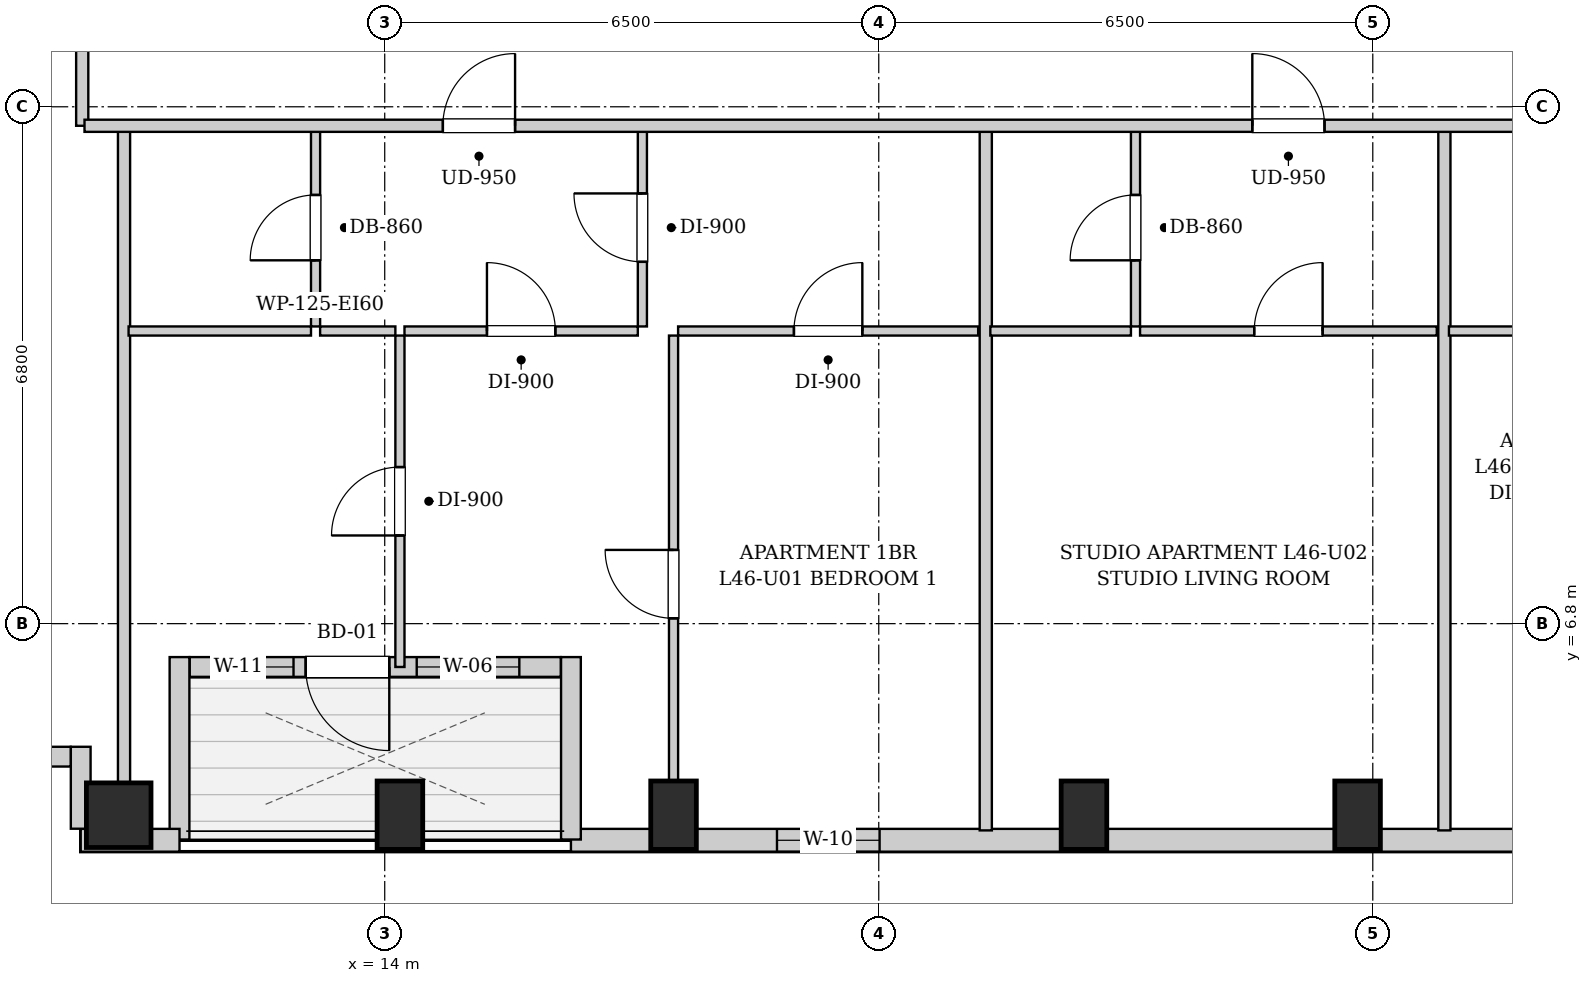
"""IFC4 building model, lengths in metres.
Left out: names, types, materials, properties, quantities, classifications, styles, units other than length and angle.
Written with IfcOpenShell. Run it as: python <this file> out.ifc"""

import sys

from ifc_helpers import new_model, si_unit, direction, frame, frame_2d, origin, origin_2d, place, context, subcontext, project, spatial, rectangle, extrude, element, fill, save


model = new_model("IFC4")
c1 = context("Model", 3, precision=1e-05, world=origin(), true_north=direction((0.0, 1.0)))
c2 = subcontext(c1, "Body", "Model", "MODEL_VIEW")
j1 = project(units=[si_unit("LENGTHUNIT", "METRE"), si_unit("PLANEANGLEUNIT", "RADIAN")], contexts=[c1])
p1 = place(None, origin())
s1 = spatial("IfcSite", under=j1, at=p1, CompositionType="ELEMENT")
p2 = place(p1, origin())
s2 = spatial("IfcBuilding", under=s1, at=p2, CompositionType="ELEMENT")
p3 = place(p2, frame((0.0, 0.0, 160.15)))
s3 = spatial("IfcBuildingStorey", under=s2, at=p3, CompositionType="ELEMENT", Elevation=160.15)
p4 = place(p3, frame((10.5, 4.28, 0.0), z_axis=(0.0, 0.0, 1.0), x_axis=(1.0, 0.0, 0.0)))
e1 = element("IfcColumn", 1, at=p4, inside=s3, PredefinedType="COLUMN", context=c2, shape_type="SweptSolid", body=[
    extrude(rectangle(XDim=0.85, YDim=0.85, at=origin_2d()), origin(), (0.0, 0.0, 1.0), 3.25),
])
for number, where, z_axis, x_axis in (
    (2, (14.2, 4.28, 0.0), (0.0, 0.0, 1.0), (1.0, 0.0, 0.0)),
    (3, (17.8, 4.28, 0.0), (0.0, 0.0, 1.0), (1.0, 0.0, 0.0)),
    (4, (23.2, 4.28, 0.0), (0.0, 0.0, 1.0), (1.0, 0.0, 0.0)),
    (5, (26.8, 4.28, 0.0), (0.0, 0.0, 1.0), (1.0, 0.0, 0.0)),
):
    element("IfcColumn", number, at=place(p3, frame(where, z_axis=z_axis, x_axis=x_axis)), inside=s3, PredefinedType="COLUMN", context=c2, shape_type="SweptSolid", body=[
        extrude(rectangle(XDim=0.6, YDim=0.9, at=origin_2d()), origin(), (0.0, 0.0, 1.0), 3.25),
    ])
p5 = place(p3, frame((31.5, 3.95, 0.0), z_axis=(0.0, 0.0, 1.0), x_axis=(-1.0, 0.0, 0.0)))
e6 = element("IfcWall", 6, at=p5, inside=s3, PredefinedType="SOLIDWALL", context=c2, shape_type="SweptSolid", body=[
    extrude(rectangle(XDim=15.05, YDim=0.3, at=frame_2d((7.525, 0.0))), origin(), (0.0, 0.0, 1.0), 2.99),
])
p6 = place(p5, frame((10.989, 0.0, 0.55)))
e7 = element("IfcOpeningElement", 7, at=p6, cuts=e6, PredefinedType="OPENING", context=c2, shape_type="SweptSolid", body=[
    extrude(rectangle(XDim=1.35, YDim=1.2, at=frame_2d((0.675, 0.6))), frame((0.0, 0.16, 0.0), z_axis=(0.0, -1.0, 0.0), x_axis=(1.0, 0.0, 0.0)), (0.0, 0.0, 1.0), 0.32),
])
p7 = place(p5, frame((1.282, 0.0, 0.55)))
e8 = element("IfcOpeningElement", 8, at=p7, cuts=e6, PredefinedType="OPENING", context=c2, shape_type="SweptSolid", body=[
    extrude(rectangle(XDim=1.35, YDim=1.2, at=frame_2d((0.675, 0.6))), frame((0.0, 0.16, 0.0), z_axis=(0.0, -1.0, 0.0), x_axis=(1.0, 0.0, 0.0)), (0.0, 0.0, 1.0), 0.32),
])
p8 = place(p3, frame((16.45, 3.96, 0.0), z_axis=(0.0, 0.0, 1.0), x_axis=(0.0, 1.0, 0.0)))
e9 = element("IfcWall", 9, at=p8, inside=s3, PredefinedType="SOLIDWALL", context=c2, shape_type="SweptSolid", body=[
    extrude(rectangle(XDim=2.4, YDim=0.26, at=frame_2d((1.2, 0.0))), origin(), (0.0, 0.0, 1.0), 2.99),
])
p9 = place(p3, frame((16.316, 6.23, 0.0), z_axis=(0.0, 0.0, 1.0), x_axis=(-1.0, 0.0, 0.0)))
e10 = element("IfcWall", 10, at=p9, inside=s3, PredefinedType="SOLIDWALL", context=c2, shape_type="SweptSolid", body=[
    extrude(rectangle(XDim=4.882, YDim=0.26, at=frame_2d((2.441, 0.0))), origin(), (0.0, 0.0, 1.0), 2.99),
])
p10 = place(p9, frame((2.256, 0.0, 0.0)))
e11 = element("IfcOpeningElement", 11, at=p10, cuts=e10, PredefinedType="OPENING", context=c2, shape_type="SweptSolid", body=[
    extrude(rectangle(XDim=1.1, YDim=2.0, at=frame_2d((0.55, 1.0))), frame((0.0, 0.14, 0.0), z_axis=(0.0, -1.0, 0.0), x_axis=(1.0, 0.0, 0.0)), (0.0, 0.0, 1.0), 0.28),
])
p11 = place(p9, frame((3.516, 0.0, 0.55)))
e12 = element("IfcOpeningElement", 12, at=p11, cuts=e10, PredefinedType="OPENING", context=c2, shape_type="SweptSolid", body=[
    extrude(rectangle(XDim=0.85, YDim=1.2, at=frame_2d((0.425, 0.6))), frame((0.0, 0.14, 0.0), z_axis=(0.0, -1.0, 0.0), x_axis=(1.0, 0.0, 0.0)), (0.0, 0.0, 1.0), 0.28),
])
p12 = place(p9, frame((0.545, 0.0, 0.85)))
e13 = element("IfcOpeningElement", 13, at=p12, cuts=e10, PredefinedType="OPENING", context=c2, shape_type="SweptSolid", body=[
    extrude(rectangle(XDim=1.35, YDim=1.65, at=frame_2d((0.675, 0.825))), frame((0.0, 0.14, 0.0), z_axis=(0.0, -1.0, 0.0), x_axis=(1.0, 0.0, 0.0)), (0.0, 0.0, 1.0), 0.28),
])
p13 = place(p3, frame((11.3, 6.36, 0.0), z_axis=(0.0, 0.0, 1.0), x_axis=(0.0, -1.0, 0.0)))
e14 = element("IfcWall", 14, at=p13, inside=s3, PredefinedType="SOLIDWALL", context=c2, shape_type="SweptSolid", body=[
    extrude(rectangle(XDim=2.4, YDim=0.26, at=frame_2d((1.2, 0.0))), origin(), (0.0, 0.0, 1.0), 2.99),
])
p14 = place(p3, frame((11.3, 3.95, 0.0), z_axis=(0.0, 0.0, 1.0), x_axis=(-1.0, 0.0, 0.0)))
e15 = element("IfcWall", 15, at=p14, inside=s3, PredefinedType="SOLIDWALL", context=c2, shape_type="SweptSolid", body=[
    extrude(rectangle(XDim=1.3, YDim=0.3, at=frame_2d((0.65, 0.0))), origin(), (0.0, 0.0, 1.0), 2.99),
])
p15 = place(p3, frame((10.0, 4.102, 0.0), z_axis=(0.0, 0.0, 1.0), x_axis=(0.0, 1.0, 0.0)))
e16 = element("IfcWall", 16, at=p15, inside=s3, PredefinedType="SOLIDWALL", context=c2, shape_type="SweptSolid", body=[
    extrude(rectangle(XDim=1.078, YDim=0.26, at=frame_2d((0.539, 0.0))), origin(), (0.0, 0.0, 1.0), 2.99),
])
p16 = place(p3, frame((9.868, 5.05, 0.0), z_axis=(0.0, 0.0, 1.0), x_axis=(-1.0, 0.0, 0.0)))
e17 = element("IfcWall", 17, at=p16, inside=s3, PredefinedType="SOLIDWALL", context=c2, shape_type="SweptSolid", body=[
    extrude(rectangle(XDim=1.248, YDim=0.26, at=frame_2d((0.624, 0.0))), origin(), (0.0, 0.0, 1.0), 2.99),
])
p17 = place(p3, frame((10.02, 13.35, 0.0), z_axis=(0.0, 0.0, 1.0), x_axis=(0.0, 1.0, 0.0)))
e18 = element("IfcWall", 18, at=p17, inside=s3, PredefinedType="PARTITIONING", context=c2, shape_type="SweptSolid", body=[
    extrude(rectangle(XDim=1.74, YDim=0.16, at=frame_2d((0.87, 0.0))), origin(), (0.0, 0.0, 1.0), 2.99),
])
p18 = place(p3, frame((10.57, 4.08, 0.0), z_axis=(0.0, 0.0, 1.0), x_axis=(0.0, 1.0, 0.0)))
e19 = element("IfcWall", 19, at=p18, inside=s3, PredefinedType="PARTITIONING", context=c2, shape_type="SweptSolid", body=[
    extrude(rectangle(XDim=9.23, YDim=0.16, at=frame_2d((4.615, 0.0))), origin(), (0.0, 0.0, 1.0), 2.99),
])
p19 = place(p3, frame((13.09, 10.71, 0.0), z_axis=(0.0, 0.0, 1.0), x_axis=(0.0, 1.0, 0.0)))
e20 = element("IfcWall", 20, at=p19, inside=s3, PredefinedType="PARTITIONING", context=c2, shape_type="SweptSolid", body=[
    extrude(rectangle(XDim=2.6, YDim=0.12, at=frame_2d((1.3, 0.0))), origin(), (0.0, 0.0, 1.0), 2.99),
])
p20 = place(p19, frame((0.87, 0.0, 0.0)))
e21 = element("IfcOpeningElement", 21, at=p20, cuts=e20, PredefinedType="OPENING", context=c2, shape_type="SweptSolid", body=[
    extrude(rectangle(XDim=0.86, YDim=2.05, at=frame_2d((0.43, 1.025))), frame((0.0, 0.07, 0.0), z_axis=(0.0, -1.0, 0.0), x_axis=(1.0, 0.0, 0.0)), (0.0, 0.0, 1.0), 0.14),
])
p21 = place(p3, frame((10.63, 10.65, 0.0), z_axis=(0.0, 0.0, 1.0), x_axis=(1.0, 0.0, 0.0)))
e22 = element("IfcWall", 22, at=p21, inside=s3, PredefinedType="PARTITIONING", context=c2, shape_type="SweptSolid", body=[
    extrude(rectangle(XDim=2.4, YDim=0.12, at=frame_2d((1.2, 0.0))), origin(), (0.0, 0.0, 1.0), 2.99),
])
p22 = place(p3, frame((17.39, 10.71, 0.0), z_axis=(0.0, 0.0, 1.0), x_axis=(0.0, 1.0, 0.0)))
e23 = element("IfcWall", 23, at=p22, inside=s3, PredefinedType="PARTITIONING", context=c2, shape_type="SweptSolid", body=[
    extrude(rectangle(XDim=2.6, YDim=0.12, at=frame_2d((1.3, 0.0))), origin(), (0.0, 0.0, 1.0), 2.99),
])
p23 = place(p22, frame((0.85, 0.0, 0.0)))
e24 = element("IfcOpeningElement", 24, at=p23, cuts=e23, PredefinedType="OPENING", context=c2, shape_type="SweptSolid", body=[
    extrude(rectangle(XDim=0.9, YDim=2.05, at=frame_2d((0.45, 1.025))), frame((0.0, 0.07, 0.0), z_axis=(0.0, -1.0, 0.0), x_axis=(1.0, 0.0, 0.0)), (0.0, 0.0, 1.0), 0.14),
])
p24 = place(p3, frame((13.15, 10.65, 0.0), z_axis=(0.0, 0.0, 1.0), x_axis=(1.0, 0.0, 0.0)))
e25 = element("IfcWall", 25, at=p24, inside=s3, PredefinedType="PARTITIONING", context=c2, shape_type="SweptSolid", body=[
    extrude(rectangle(XDim=0.99, YDim=0.12, at=frame_2d((0.495, 0.0))), origin(), (0.0, 0.0, 1.0), 2.99),
])
p25 = place(p3, frame((14.26, 10.65, 0.0), z_axis=(0.0, 0.0, 1.0), x_axis=(1.0, 0.0, 0.0)))
e26 = element("IfcWall", 26, at=p25, inside=s3, PredefinedType="PARTITIONING", context=c2, shape_type="SweptSolid", body=[
    extrude(rectangle(XDim=3.07, YDim=0.12, at=frame_2d((1.535, 0.0))), origin(), (0.0, 0.0, 1.0), 2.99),
])
p26 = place(p25, frame((1.085, 0.0, 0.0)))
e27 = element("IfcOpeningElement", 27, at=p26, cuts=e26, PredefinedType="OPENING", context=c2, shape_type="SweptSolid", body=[
    extrude(rectangle(XDim=0.9, YDim=2.05, at=frame_2d((0.45, 1.025))), frame((0.0, 0.07, 0.0), z_axis=(0.0, -1.0, 0.0), x_axis=(1.0, 0.0, 0.0)), (0.0, 0.0, 1.0), 0.14),
])
p27 = place(p3, frame((17.86, 10.65, 0.0), z_axis=(0.0, 0.0, 1.0), x_axis=(1.0, 0.0, 0.0)))
e28 = element("IfcWall", 28, at=p27, inside=s3, PredefinedType="PARTITIONING", context=c2, shape_type="SweptSolid", body=[
    extrude(rectangle(XDim=3.948, YDim=0.12, at=frame_2d((1.974, 0.0))), origin(), (0.0, 0.0, 1.0), 2.99),
])
p28 = place(p27, frame((1.524, 0.0, 0.0)))
e29 = element("IfcOpeningElement", 29, at=p28, cuts=e28, PredefinedType="OPENING", context=c2, shape_type="SweptSolid", body=[
    extrude(rectangle(XDim=0.9, YDim=2.05, at=frame_2d((0.45, 1.025))), frame((0.0, 0.07, 0.0), z_axis=(0.0, -1.0, 0.0), x_axis=(1.0, 0.0, 0.0)), (0.0, 0.0, 1.0), 0.14),
])
p29 = place(p3, frame((14.2, 6.23, 0.0), z_axis=(0.0, 0.0, 1.0), x_axis=(0.0, 1.0, 0.0)))
e30 = element("IfcWall", 30, at=p29, inside=s3, PredefinedType="PARTITIONING", context=c2, shape_type="SweptSolid", body=[
    extrude(rectangle(XDim=4.36, YDim=0.12, at=frame_2d((2.18, 0.0))), origin(), (0.0, 0.0, 1.0), 2.99),
])
p30 = place(p29, frame((1.73, 0.0, 0.0)))
e31 = element("IfcOpeningElement", 31, at=p30, cuts=e30, PredefinedType="OPENING", context=c2, shape_type="SweptSolid", body=[
    extrude(rectangle(XDim=0.9, YDim=2.05, at=frame_2d((0.45, 1.025))), frame((0.0, 0.07, 0.0), z_axis=(0.0, -1.0, 0.0), x_axis=(1.0, 0.0, 0.0)), (0.0, 0.0, 1.0), 0.14),
])
p31 = place(p3, frame((17.8, 4.08, 0.0), z_axis=(0.0, 0.0, 1.0), x_axis=(0.0, 1.0, 0.0)))
e32 = element("IfcWall", 32, at=p31, inside=s3, PredefinedType="PARTITIONING", context=c2, shape_type="SweptSolid", body=[
    extrude(rectangle(XDim=6.51, YDim=0.12, at=frame_2d((3.255, 0.0))), origin(), (0.0, 0.0, 1.0), 2.442),
])
p32 = place(p31, frame((2.79, 0.0, 0.0)))
e33 = element("IfcOpeningElement", 33, at=p32, cuts=e32, PredefinedType="OPENING", context=c2, shape_type="SweptSolid", body=[
    extrude(rectangle(XDim=0.9, YDim=2.05, at=frame_2d((0.45, 1.025))), frame((0.0, 0.07, 0.0), z_axis=(0.0, -1.0, 0.0), x_axis=(1.0, 0.0, 0.0)), (0.0, 0.0, 1.0), 0.14),
])
p33 = place(p3, frame((21.908, 4.08, 0.0), z_axis=(0.0, 0.0, 1.0), x_axis=(0.0, 1.0, 0.0)))
e34 = element("IfcWall", 34, at=p33, inside=s3, PredefinedType="PARTITIONING", context=c2, shape_type="SweptSolid", body=[
    extrude(rectangle(XDim=9.23, YDim=0.16, at=frame_2d((4.615, 0.0))), origin(), (0.0, 0.0, 1.0), 2.99),
])
p34 = place(p3, frame((23.878, 10.71, 0.0), z_axis=(0.0, 0.0, 1.0), x_axis=(0.0, 1.0, 0.0)))
e35 = element("IfcWall", 35, at=p34, inside=s3, PredefinedType="PARTITIONING", context=c2, shape_type="SweptSolid", body=[
    extrude(rectangle(XDim=2.6, YDim=0.12, at=frame_2d((1.3, 0.0))), origin(), (0.0, 0.0, 1.0), 2.99),
])
p35 = place(p34, frame((0.87, 0.0, 0.0)))
e36 = element("IfcOpeningElement", 36, at=p35, cuts=e35, PredefinedType="OPENING", context=c2, shape_type="SweptSolid", body=[
    extrude(rectangle(XDim=0.86, YDim=2.05, at=frame_2d((0.43, 1.025))), frame((0.0, 0.07, 0.0), z_axis=(0.0, -1.0, 0.0), x_axis=(1.0, 0.0, 0.0)), (0.0, 0.0, 1.0), 0.14),
])
p36 = place(p3, frame((21.968, 10.65, 0.0), z_axis=(0.0, 0.0, 1.0), x_axis=(1.0, 0.0, 0.0)))
e37 = element("IfcWall", 37, at=p36, inside=s3, PredefinedType="PARTITIONING", context=c2, shape_type="SweptSolid", body=[
    extrude(rectangle(XDim=1.85, YDim=0.12, at=frame_2d((0.925, 0.0))), origin(), (0.0, 0.0, 1.0), 2.99),
])
p37 = place(p3, frame((23.938, 10.65, 0.0), z_axis=(0.0, 0.0, 1.0), x_axis=(1.0, 0.0, 0.0)))
e38 = element("IfcWall", 38, at=p37, inside=s3, PredefinedType="PARTITIONING", context=c2, shape_type="SweptSolid", body=[
    extrude(rectangle(XDim=3.904, YDim=0.12, at=frame_2d((1.952, 0.0))), origin(), (0.0, 0.0, 1.0), 2.99),
])
p38 = place(p37, frame((1.502, 0.0, 0.0)))
e39 = element("IfcOpeningElement", 39, at=p38, cuts=e38, PredefinedType="OPENING", context=c2, shape_type="SweptSolid", body=[
    extrude(rectangle(XDim=0.9, YDim=2.05, at=frame_2d((0.45, 1.025))), frame((0.0, 0.07, 0.0), z_axis=(0.0, -1.0, 0.0), x_axis=(1.0, 0.0, 0.0)), (0.0, 0.0, 1.0), 0.14),
])
p39 = place(p3, frame((27.942, 4.08, 0.0), z_axis=(0.0, 0.0, 1.0), x_axis=(0.0, 1.0, 0.0)))
e40 = element("IfcWall", 40, at=p39, inside=s3, PredefinedType="PARTITIONING", context=c2, shape_type="SweptSolid", body=[
    extrude(rectangle(XDim=9.23, YDim=0.16, at=frame_2d((4.615, 0.0))), origin(), (0.0, 0.0, 1.0), 2.99),
])
p40 = place(p3, frame((28.002, 10.65, 0.0), z_axis=(0.0, 0.0, 1.0), x_axis=(1.0, 0.0, 0.0)))
e41 = element("IfcWall", 41, at=p40, inside=s3, PredefinedType="PARTITIONING", context=c2, shape_type="SweptSolid", body=[
    extrude(rectangle(XDim=2.4, YDim=0.12, at=frame_2d((1.2, 0.0))), origin(), (0.0, 0.0, 1.0), 2.99),
])
p41 = place(p3, frame((10.05, 13.35, 0.0), z_axis=(0.0, 0.0, 1.0), x_axis=(1.0, 0.0, 0.0)))
e42 = element("IfcWall", 42, at=p41, inside=s3, PredefinedType="PARTITIONING", context=c2, shape_type="SweptSolid", body=[
    extrude(rectangle(XDim=27.7, YDim=0.16, at=frame_2d((13.85, 0.0))), origin(), (0.0, 0.0, 1.0), 2.99),
])
p42 = place(p41, frame((4.715, 0.0, 0.0)))
e43 = element("IfcOpeningElement", 43, at=p42, cuts=e42, PredefinedType="OPENING", context=c2, shape_type="SweptSolid", body=[
    extrude(rectangle(XDim=0.95, YDim=2.1, at=frame_2d((0.475, 1.05))), frame((0.0, 0.09, 0.0), z_axis=(0.0, -1.0, 0.0), x_axis=(1.0, 0.0, 0.0)), (0.0, 0.0, 1.0), 0.18),
])
p43 = place(p41, frame((15.365, 0.0, 0.0)))
e44 = element("IfcOpeningElement", 44, at=p43, cuts=e42, PredefinedType="OPENING", context=c2, shape_type="SweptSolid", body=[
    extrude(rectangle(XDim=0.95, YDim=2.1, at=frame_2d((0.475, 1.05))), frame((0.0, 0.09, 0.0), z_axis=(0.0, -1.0, 0.0), x_axis=(1.0, 0.0, 0.0)), (0.0, 0.0, 1.0), 0.18),
])
p44 = place(p41, frame((21.565, 0.0, 0.0)))
e45 = element("IfcOpeningElement", 45, at=p44, cuts=e42, PredefinedType="OPENING", context=c2, shape_type="SweptSolid", body=[
    extrude(rectangle(XDim=0.95, YDim=2.1, at=frame_2d((0.475, 1.05))), frame((0.0, 0.09, 0.0), z_axis=(0.0, -1.0, 0.0), x_axis=(1.0, 0.0, 0.0)), (0.0, 0.0, 1.0), 0.18),
])
p45 = place(p20, origin())
e46 = element("IfcDoor", 46, at=p45, inside=s3, OperationType="SINGLE_SWING_LEFT", PredefinedType="DOOR", context=c2, shape_type="SweptSolid", body=[
    extrude(rectangle(XDim=0.86, YDim=2.05, at=frame_2d((0.43, 1.025))), frame((0.0, 0.025, 0.0), z_axis=(0.0, -1.0, 0.0), x_axis=(1.0, 0.0, 0.0)), (0.0, 0.0, 1.0), 0.05),
])
fill(e21, e46)
p46 = place(p23, origin())
e47 = element("IfcDoor", 47, at=p46, inside=s3, OperationType="SINGLE_SWING_RIGHT", PredefinedType="DOOR", context=c2, shape_type="SweptSolid", body=[
    extrude(rectangle(XDim=0.9, YDim=2.05, at=frame_2d((0.45, 1.025))), frame((0.0, 0.025, 0.0), z_axis=(0.0, -1.0, 0.0), x_axis=(1.0, 0.0, 0.0)), (0.0, 0.0, 1.0), 0.05),
])
fill(e24, e47)
p47 = place(p26, origin())
e48 = element("IfcDoor", 48, at=p47, inside=s3, OperationType="SINGLE_SWING_LEFT", PredefinedType="DOOR", context=c2, shape_type="SweptSolid", body=[
    extrude(rectangle(XDim=0.9, YDim=2.05, at=frame_2d((0.45, 1.025))), frame((0.0, 0.025, 0.0), z_axis=(0.0, -1.0, 0.0), x_axis=(1.0, 0.0, 0.0)), (0.0, 0.0, 1.0), 0.05),
])
fill(e27, e48)
p48 = place(p28, origin())
e49 = element("IfcDoor", 49, at=p48, inside=s3, OperationType="SINGLE_SWING_RIGHT", PredefinedType="DOOR", context=c2, shape_type="SweptSolid", body=[
    extrude(rectangle(XDim=0.9, YDim=2.05, at=frame_2d((0.45, 1.025))), frame((0.0, 0.025, 0.0), z_axis=(0.0, -1.0, 0.0), x_axis=(1.0, 0.0, 0.0)), (0.0, 0.0, 1.0), 0.05),
])
fill(e29, e49)
p49 = place(p30, origin())
e50 = element("IfcDoor", 50, at=p49, inside=s3, OperationType="SINGLE_SWING_LEFT", PredefinedType="DOOR", context=c2, shape_type="SweptSolid", body=[
    extrude(rectangle(XDim=0.9, YDim=2.05, at=frame_2d((0.45, 1.025))), frame((0.0, 0.025, 0.0), z_axis=(0.0, -1.0, 0.0), x_axis=(1.0, 0.0, 0.0)), (0.0, 0.0, 1.0), 0.05),
])
fill(e31, e50)
p50 = place(p32, origin())
e51 = element("IfcDoor", 51, at=p50, inside=s3, OperationType="SINGLE_SWING_RIGHT", PredefinedType="DOOR", context=c2, shape_type="SweptSolid", body=[
    extrude(rectangle(XDim=0.9, YDim=2.05, at=frame_2d((0.45, 1.025))), frame((0.0, 0.025, 0.0), z_axis=(0.0, -1.0, 0.0), x_axis=(1.0, 0.0, 0.0)), (0.0, 0.0, 1.0), 0.05),
])
fill(e33, e51)
p51 = place(p35, origin())
e52 = element("IfcDoor", 52, at=p51, inside=s3, OperationType="SINGLE_SWING_LEFT", PredefinedType="DOOR", context=c2, shape_type="SweptSolid", body=[
    extrude(rectangle(XDim=0.86, YDim=2.05, at=frame_2d((0.43, 1.025))), frame((0.0, 0.025, 0.0), z_axis=(0.0, -1.0, 0.0), x_axis=(1.0, 0.0, 0.0)), (0.0, 0.0, 1.0), 0.05),
])
fill(e36, e52)
p52 = place(p38, origin())
e53 = element("IfcDoor", 53, at=p52, inside=s3, OperationType="SINGLE_SWING_RIGHT", PredefinedType="DOOR", context=c2, shape_type="SweptSolid", body=[
    extrude(rectangle(XDim=0.9, YDim=2.05, at=frame_2d((0.45, 1.025))), frame((0.0, 0.025, 0.0), z_axis=(0.0, -1.0, 0.0), x_axis=(1.0, 0.0, 0.0)), (0.0, 0.0, 1.0), 0.05),
])
fill(e39, e53)
p53 = place(p42, origin())
e54 = element("IfcDoor", 54, at=p53, inside=s3, OperationType="SINGLE_SWING_RIGHT", PredefinedType="DOOR", context=c2, shape_type="SweptSolid", body=[
    extrude(rectangle(XDim=0.95, YDim=2.1, at=frame_2d((0.475, 1.05))), frame((0.0, 0.025, 0.0), z_axis=(0.0, -1.0, 0.0), x_axis=(1.0, 0.0, 0.0)), (0.0, 0.0, 1.0), 0.05),
])
fill(e43, e54)
p54 = place(p43, origin())
e55 = element("IfcDoor", 55, at=p54, inside=s3, OperationType="SINGLE_SWING_LEFT", PredefinedType="DOOR", context=c2, shape_type="SweptSolid", body=[
    extrude(rectangle(XDim=0.95, YDim=2.1, at=frame_2d((0.475, 1.05))), frame((0.0, 0.025, 0.0), z_axis=(0.0, -1.0, 0.0), x_axis=(1.0, 0.0, 0.0)), (0.0, 0.0, 1.0), 0.05),
])
fill(e44, e55)
p55 = place(p10, origin())
e56 = element("IfcDoor", 56, at=p55, inside=s3, OperationType="SINGLE_SWING_LEFT", PredefinedType="DOOR", context=c2, shape_type="SweptSolid", body=[
    extrude(rectangle(XDim=1.1, YDim=2.0, at=frame_2d((0.55, 1.0))), frame((0.0, 0.025, 0.0), z_axis=(0.0, -1.0, 0.0), x_axis=(1.0, 0.0, 0.0)), (0.0, 0.0, 1.0), 0.05),
])
fill(e11, e56)
p56 = place(p11, origin())
e57 = element("IfcWindow", 57, at=p56, inside=s3, PartitioningType="SINGLE_PANEL", PredefinedType="WINDOW", context=c2, shape_type="SweptSolid", body=[
    extrude(rectangle(XDim=0.85, YDim=1.2, at=frame_2d((0.425, 0.6))), frame((0.0, 0.03, 0.0), z_axis=(0.0, -1.0, 0.0), x_axis=(1.0, 0.0, 0.0)), (0.0, 0.0, 1.0), 0.06),
])
fill(e12, e57)
p57 = place(p12, origin())
e58 = element("IfcWindow", 58, at=p57, inside=s3, PartitioningType="SINGLE_PANEL", PredefinedType="WINDOW", context=c2, shape_type="SweptSolid", body=[
    extrude(rectangle(XDim=1.35, YDim=1.65, at=frame_2d((0.675, 0.825))), frame((0.0, 0.03, 0.0), z_axis=(0.0, -1.0, 0.0), x_axis=(1.0, 0.0, 0.0)), (0.0, 0.0, 1.0), 0.06),
])
fill(e13, e58)
p58 = place(p6, origin())
e59 = element("IfcWindow", 59, at=p58, inside=s3, PartitioningType="SINGLE_PANEL", PredefinedType="WINDOW", context=c2, shape_type="SweptSolid", body=[
    extrude(rectangle(XDim=1.35, YDim=1.2, at=frame_2d((0.675, 0.6))), frame((0.0, 0.03, 0.0), z_axis=(0.0, -1.0, 0.0), x_axis=(1.0, 0.0, 0.0)), (0.0, 0.0, 1.0), 0.06),
])
fill(e7, e59)
save(model, sys.argv[1])
